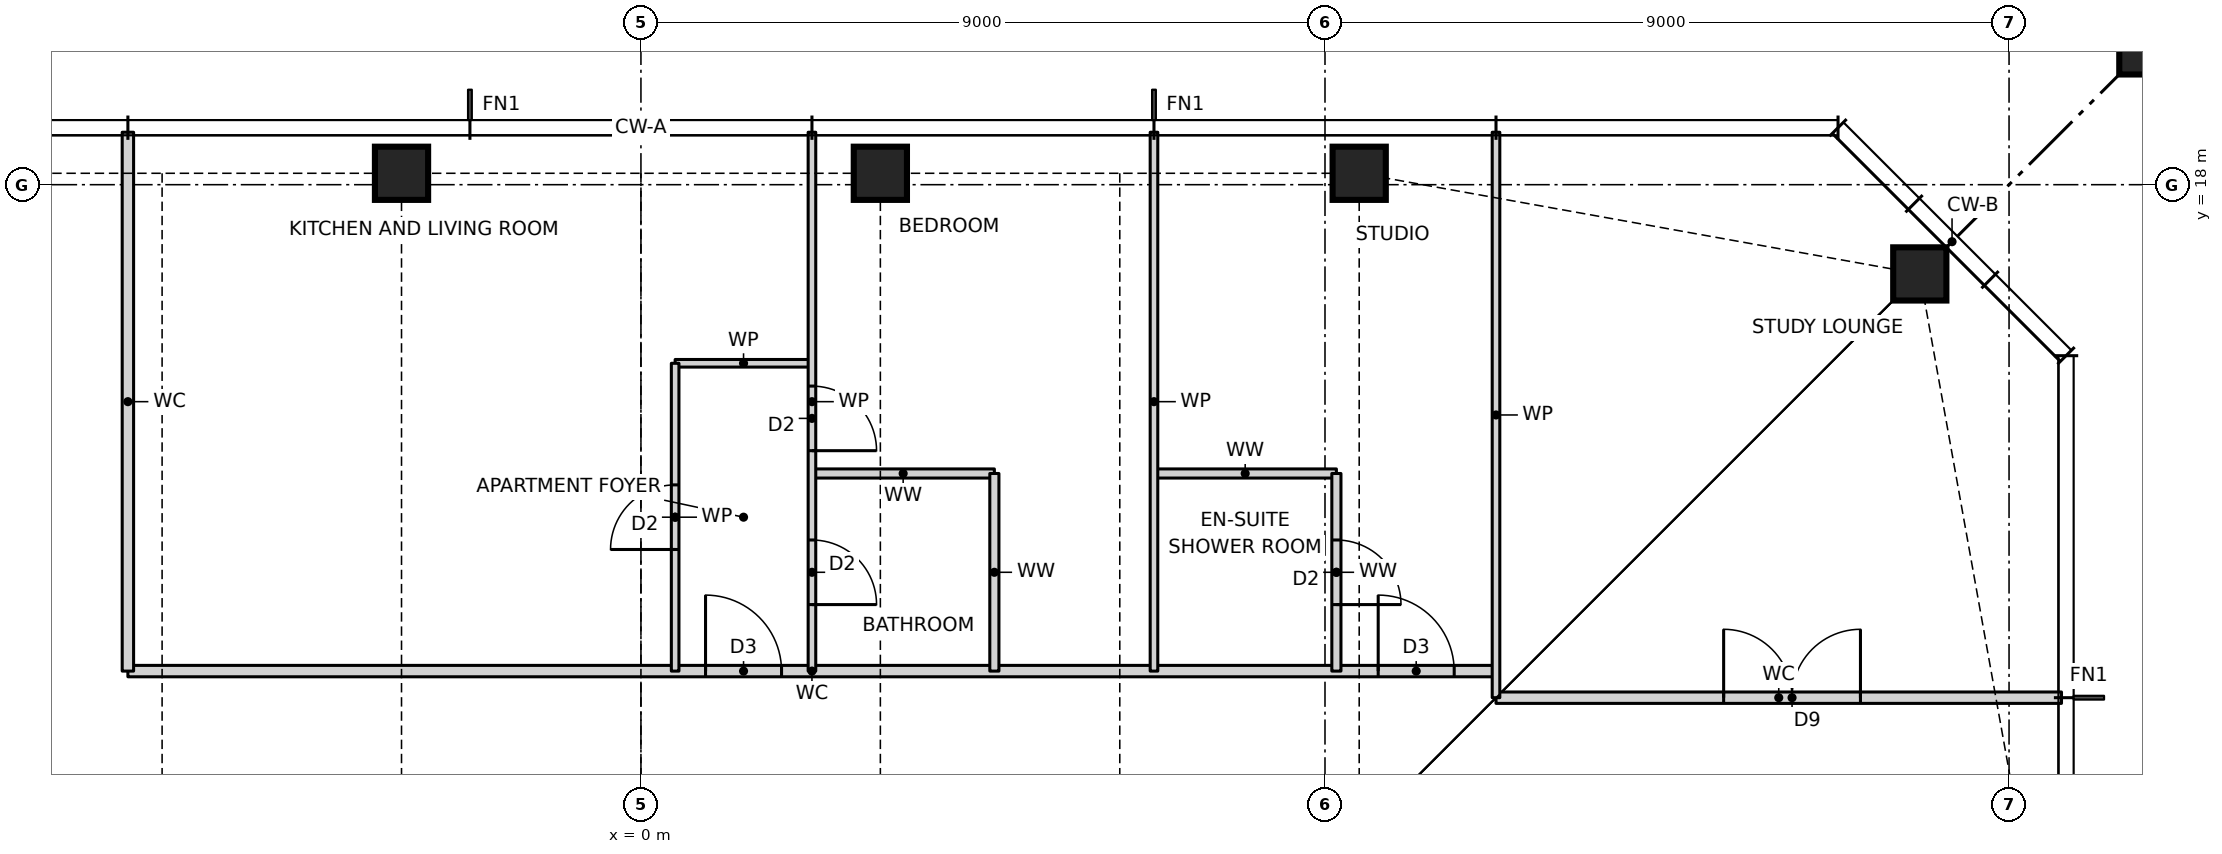
"""IFC4 building model, lengths in metres.
Left out: names, types, materials, properties, quantities, classifications, styles, units other than length and angle.
Written with IfcOpenShell. Run it as: python <this file> out.ifc"""

import sys

from ifc_helpers import new_model, si_unit, direction, frame, frame_2d, origin, origin_2d, place, context, subcontext, project, spatial, rectangle, hollow_rectangle, i_section, extrude, element, fill, save


model = new_model("IFC4")
c1 = context("Model", 3, precision=1e-05, world=origin(), true_north=direction((0.0, 1.0)))
c2 = subcontext(c1, "Body", "Model", "MODEL_VIEW")
j1 = project(units=[si_unit("LENGTHUNIT", "METRE"), si_unit("PLANEANGLEUNIT", "RADIAN")], contexts=[c1])
p1 = place(None, origin())
s1 = spatial("IfcSite", under=j1, at=p1, CompositionType="ELEMENT")
p2 = place(p1, origin())
s2 = spatial("IfcBuilding", under=s1, at=p2, CompositionType="ELEMENT")
p3 = place(p2, frame((0.0, 0.0, 188.0)))
s3 = spatial("IfcBuildingStorey", under=s2, at=p3, CompositionType="ELEMENT", Elevation=188.0)
for number, where, z_axis, x_axis in (
    (1, (16.826, 16.826, 0.0), (0.0, 0.0, 1.0), (1.0, 0.0, 0.0)),
    (2, (9.45, 18.15, 0.0), (0.0, 0.0, 1.0), (1.0, 0.0, 0.0)),
    (3, (3.15, 18.15, 0.0), (0.0, 0.0, 1.0), (1.0, 0.0, 0.0)),
    (4, (-3.15, 18.15, 0.0), (0.0, 0.0, 1.0), (1.0, 0.0, 0.0)),
):
    element("IfcColumn", number, at=place(p3, frame(where, z_axis=z_axis, x_axis=x_axis)), inside=s3, PredefinedType="COLUMN", context=c2, shape_type="SweptSolid", body=[
        extrude(hollow_rectangle(XDim=0.7, YDim=0.7, WallThickness=0.06, at=origin_2d()), origin(), (0.0, 0.0, 1.0), 3.5),
    ])
p4 = place(p3, frame((21.65, 21.65, 0.0), z_axis=(0.0, 0.0, 1.0), x_axis=(1.0, 0.0, 0.0)))
e5 = element("IfcColumn", 5, at=p4, inside=s3, PredefinedType="COLUMN", context=c2, shape_type="SweptSolid", body=[
    extrude(rectangle(XDim=4.4, YDim=4.4, at=origin_2d()), origin(), (0.0, 0.0, 1.0), 3.5),
    extrude(i_section(OverallWidth=0.478, OverallDepth=0.599, WebThickness=0.1, FlangeThickness=0.14, at=origin_2d()), origin(), (0.0, 0.0, 1.0), 3.5),
])
p5 = place(p3, frame((11.25, 11.25, 0.0), z_axis=(0.0, 0.0, 1.0), x_axis=(1.0, 0.0, 0.0)))
e6 = element("IfcWall", 6, at=p5, inside=s3, PredefinedType="PARTITIONING", context=c2, shape_type="SweptSolid", body=[
    extrude(rectangle(XDim=7.44, YDim=0.15, at=frame_2d((3.72, 0.0))), origin(), (0.0, 0.0, 1.0), 3.27),
])
p6 = place(p5, frame((2.995, 0.0, 0.0)))
e7 = element("IfcOpeningElement", 7, at=p6, cuts=e6, PredefinedType="OPENING", context=c2, shape_type="SweptSolid", body=[
    extrude(rectangle(XDim=1.8, YDim=2.1, at=frame_2d((0.9, 1.05))), frame((0.0, 0.085, 0.0), z_axis=(0.0, -1.0, 0.0), x_axis=(1.0, 0.0, 0.0)), (0.0, 0.0, 1.0), 0.17),
])
p7 = place(p3, frame((-6.75, 11.6, 0.0), z_axis=(0.0, 0.0, 1.0), x_axis=(1.0, 0.0, 0.0)))
e8 = element("IfcWall", 8, at=p7, inside=s3, PredefinedType="PARTITIONING", context=c2, shape_type="SweptSolid", body=[
    extrude(rectangle(XDim=18.0, YDim=0.15, at=frame_2d((9.0, 0.0))), origin(), (0.0, 0.0, 1.0), 3.27),
])
p8 = place(p7, frame((16.45, 0.0, 0.0)))
e9 = element("IfcOpeningElement", 9, at=p8, cuts=e8, PredefinedType="OPENING", context=c2, shape_type="SweptSolid", body=[
    extrude(rectangle(XDim=1.0, YDim=2.1, at=frame_2d((0.5, 1.05))), frame((0.0, 0.085, 0.0), z_axis=(0.0, -1.0, 0.0), x_axis=(1.0, 0.0, 0.0)), (0.0, 0.0, 1.0), 0.17),
])
p9 = place(p7, frame((7.6, 0.0, 0.0)))
e10 = element("IfcOpeningElement", 10, at=p9, cuts=e8, PredefinedType="OPENING", context=c2, shape_type="SweptSolid", body=[
    extrude(rectangle(XDim=1.0, YDim=2.1, at=frame_2d((0.5, 1.05))), frame((0.0, 0.085, 0.0), z_axis=(0.0, -1.0, 0.0), x_axis=(1.0, 0.0, 0.0)), (0.0, 0.0, 1.0), 0.17),
])
for number, where, z_axis, x_axis in (
    (11, (2.25, 14.2, 0.0), (0.0, 0.0, 1.0), (1.0, 0.0, 0.0)),
    (12, (6.75, 14.2, 0.0), (0.0, 0.0, 1.0), (1.0, 0.0, 0.0)),
):
    element("IfcWall", number, at=place(p3, frame(where, z_axis=z_axis, x_axis=x_axis)), inside=s3, PredefinedType="PARTITIONING", context=c2, shape_type="SweptSolid", body=[
        extrude(rectangle(XDim=2.4, YDim=0.12, at=frame_2d((1.2, 0.0))), origin(), (0.0, 0.0, 1.0), 3.27),
    ])
p10 = place(p3, frame((0.45, 15.65, 0.0), z_axis=(0.0, 0.0, 1.0), x_axis=(1.0, 0.0, 0.0)))
e13 = element("IfcWall", 13, at=p10, inside=s3, PredefinedType="PARTITIONING", context=c2, shape_type="SweptSolid", body=[
    extrude(rectangle(XDim=1.8, YDim=0.1, at=frame_2d((0.9, 0.0))), origin(), (0.0, 0.0, 1.0), 3.27),
])
p11 = place(p3, frame((11.25, 11.25, 0.0), z_axis=(0.0, 0.0, 1.0), x_axis=(0.0, 1.0, 0.0)))
e14 = element("IfcWall", 14, at=p11, inside=s3, PredefinedType="PARTITIONING", context=c2, shape_type="SweptSolid", body=[
    extrude(rectangle(XDim=7.44, YDim=0.1, at=frame_2d((3.72, 0.0))), origin(), (0.0, 0.0, 1.0), 3.27),
])
p12 = place(p3, frame((9.15, 11.6, 0.0), z_axis=(0.0, 0.0, 1.0), x_axis=(0.0, 1.0, 0.0)))
e15 = element("IfcWall", 15, at=p12, inside=s3, PredefinedType="PARTITIONING", context=c2, shape_type="SweptSolid", body=[
    extrude(rectangle(XDim=2.6, YDim=0.12, at=frame_2d((1.3, 0.0))), origin(), (0.0, 0.0, 1.0), 3.27),
])
p13 = place(p12, frame((0.875, 0.0, 0.0)))
e16 = element("IfcOpeningElement", 16, at=p13, cuts=e15, PredefinedType="OPENING", context=c2, shape_type="SweptSolid", body=[
    extrude(rectangle(XDim=0.85, YDim=2.1, at=frame_2d((0.425, 1.05))), frame((0.0, 0.07, 0.0), z_axis=(0.0, -1.0, 0.0), x_axis=(1.0, 0.0, 0.0)), (0.0, 0.0, 1.0), 0.14),
])
p14 = place(p3, frame((6.75, 11.6, 0.0), z_axis=(0.0, 0.0, 1.0), x_axis=(0.0, 1.0, 0.0)))
e17 = element("IfcWall", 17, at=p14, inside=s3, PredefinedType="PARTITIONING", context=c2, shape_type="SweptSolid", body=[
    extrude(rectangle(XDim=7.09, YDim=0.1, at=frame_2d((3.545, 0.0))), origin(), (0.0, 0.0, 1.0), 3.27),
])
p15 = place(p3, frame((4.65, 11.6, 0.0), z_axis=(0.0, 0.0, 1.0), x_axis=(0.0, 1.0, 0.0)))
e18 = element("IfcWall", 18, at=p15, inside=s3, PredefinedType="PARTITIONING", context=c2, shape_type="SweptSolid", body=[
    extrude(rectangle(XDim=2.6, YDim=0.12, at=frame_2d((1.3, 0.0))), origin(), (0.0, 0.0, 1.0), 3.27),
])
p16 = place(p3, frame((2.25, 11.6, 0.0), z_axis=(0.0, 0.0, 1.0), x_axis=(0.0, 1.0, 0.0)))
e19 = element("IfcWall", 19, at=p16, inside=s3, PredefinedType="PARTITIONING", context=c2, shape_type="SweptSolid", body=[
    extrude(rectangle(XDim=7.09, YDim=0.1, at=frame_2d((3.545, 0.0))), origin(), (0.0, 0.0, 1.0), 3.27),
])
p17 = place(p16, frame((2.9, 0.0, 0.0)))
e20 = element("IfcOpeningElement", 20, at=p17, cuts=e19, PredefinedType="OPENING", context=c2, shape_type="SweptSolid", body=[
    extrude(rectangle(XDim=0.85, YDim=2.1, at=frame_2d((0.425, 1.05))), frame((0.0, 0.06, 0.0), z_axis=(0.0, -1.0, 0.0), x_axis=(1.0, 0.0, 0.0)), (0.0, 0.0, 1.0), 0.12),
])
p18 = place(p16, frame((0.875, 0.0, 0.0)))
e21 = element("IfcOpeningElement", 21, at=p18, cuts=e19, PredefinedType="OPENING", context=c2, shape_type="SweptSolid", body=[
    extrude(rectangle(XDim=0.85, YDim=2.1, at=frame_2d((0.425, 1.05))), frame((0.0, 0.06, 0.0), z_axis=(0.0, -1.0, 0.0), x_axis=(1.0, 0.0, 0.0)), (0.0, 0.0, 1.0), 0.12),
])
p19 = place(p3, frame((0.45, 11.6, 0.0), z_axis=(0.0, 0.0, 1.0), x_axis=(0.0, 1.0, 0.0)))
e22 = element("IfcWall", 22, at=p19, inside=s3, PredefinedType="PARTITIONING", context=c2, shape_type="SweptSolid", body=[
    extrude(rectangle(XDim=4.05, YDim=0.1, at=frame_2d((2.025, 0.0))), origin(), (0.0, 0.0, 1.0), 3.27),
])
p20 = place(p19, frame((1.6, 0.0, 0.0)))
e23 = element("IfcOpeningElement", 23, at=p20, cuts=e22, PredefinedType="OPENING", context=c2, shape_type="SweptSolid", body=[
    extrude(rectangle(XDim=0.85, YDim=2.1, at=frame_2d((0.425, 1.05))), frame((0.0, 0.06, 0.0), z_axis=(0.0, -1.0, 0.0), x_axis=(1.0, 0.0, 0.0)), (0.0, 0.0, 1.0), 0.12),
])
p21 = place(p3, frame((-6.75, 11.6, 0.0), z_axis=(0.0, 0.0, 1.0), x_axis=(0.0, 1.0, 0.0)))
e24 = element("IfcWall", 24, at=p21, inside=s3, PredefinedType="PARTITIONING", context=c2, shape_type="SweptSolid", body=[
    extrude(rectangle(XDim=7.09, YDim=0.15, at=frame_2d((3.545, 0.0))), origin(), (0.0, 0.0, 1.0), 3.27),
])
p22 = place(p8, origin())
e25 = element("IfcDoor", 25, at=p22, inside=s3, OperationType="SINGLE_SWING_LEFT", PredefinedType="DOOR", context=c2, shape_type="SweptSolid", body=[
    extrude(rectangle(XDim=1.0, YDim=2.1, at=frame_2d((0.5, 1.05))), frame((0.0, 0.025, 0.0), z_axis=(0.0, -1.0, 0.0), x_axis=(1.0, 0.0, 0.0)), (0.0, 0.0, 1.0), 0.05),
])
fill(e9, e25)
p23 = place(p13, frame((0.85, 0.0, 0.0), z_axis=(0.0, 0.0, 1.0), x_axis=(-1.0, 0.0, 0.0)))
e26 = element("IfcDoor", 26, at=p23, inside=s3, OperationType="SINGLE_SWING_RIGHT", PredefinedType="DOOR", context=c2, shape_type="SweptSolid", body=[
    extrude(rectangle(XDim=0.85, YDim=2.1, at=frame_2d((0.425, 1.05))), frame((0.0, 0.025, 0.0), z_axis=(0.0, -1.0, 0.0), x_axis=(1.0, 0.0, 0.0)), (0.0, 0.0, 1.0), 0.05),
])
fill(e16, e26)
p24 = place(p9, origin())
e27 = element("IfcDoor", 27, at=p24, inside=s3, OperationType="SINGLE_SWING_LEFT", PredefinedType="DOOR", context=c2, shape_type="SweptSolid", body=[
    extrude(rectangle(XDim=1.0, YDim=2.1, at=frame_2d((0.5, 1.05))), frame((0.0, 0.025, 0.0), z_axis=(0.0, -1.0, 0.0), x_axis=(1.0, 0.0, 0.0)), (0.0, 0.0, 1.0), 0.05),
])
fill(e10, e27)
p25 = place(p20, origin())
e28 = element("IfcDoor", 28, at=p25, inside=s3, OperationType="SINGLE_SWING_LEFT", PredefinedType="DOOR", context=c2, shape_type="SweptSolid", body=[
    extrude(rectangle(XDim=0.85, YDim=2.1, at=frame_2d((0.425, 1.05))), frame((0.0, 0.025, 0.0), z_axis=(0.0, -1.0, 0.0), x_axis=(1.0, 0.0, 0.0)), (0.0, 0.0, 1.0), 0.05),
])
fill(e23, e28)
p26 = place(p17, frame((0.85, 0.0, 0.0), z_axis=(0.0, 0.0, 1.0), x_axis=(-1.0, 0.0, 0.0)))
e29 = element("IfcDoor", 29, at=p26, inside=s3, OperationType="SINGLE_SWING_RIGHT", PredefinedType="DOOR", context=c2, shape_type="SweptSolid", body=[
    extrude(rectangle(XDim=0.85, YDim=2.1, at=frame_2d((0.425, 1.05))), frame((0.0, 0.025, 0.0), z_axis=(0.0, -1.0, 0.0), x_axis=(1.0, 0.0, 0.0)), (0.0, 0.0, 1.0), 0.05),
])
fill(e20, e29)
p27 = place(p18, frame((0.85, 0.0, 0.0), z_axis=(0.0, 0.0, 1.0), x_axis=(-1.0, 0.0, 0.0)))
e30 = element("IfcDoor", 30, at=p27, inside=s3, OperationType="SINGLE_SWING_RIGHT", PredefinedType="DOOR", context=c2, shape_type="SweptSolid", body=[
    extrude(rectangle(XDim=0.85, YDim=2.1, at=frame_2d((0.425, 1.05))), frame((0.0, 0.025, 0.0), z_axis=(0.0, -1.0, 0.0), x_axis=(1.0, 0.0, 0.0)), (0.0, 0.0, 1.0), 0.05),
])
fill(e21, e30)
p28 = place(p6, origin())
e31 = element("IfcDoor", 31, at=p28, inside=s3, OperationType="DOUBLE_DOOR_SINGLE_SWING", PredefinedType="DOOR", context=c2, shape_type="SweptSolid", body=[
    extrude(rectangle(XDim=1.8, YDim=2.1, at=frame_2d((0.9, 1.05))), frame((0.0, 0.025, 0.0), z_axis=(0.0, -1.0, 0.0), x_axis=(1.0, 0.0, 0.0)), (0.0, 0.0, 1.0), 0.05),
])
fill(e7, e31)
save(model, sys.argv[1])
